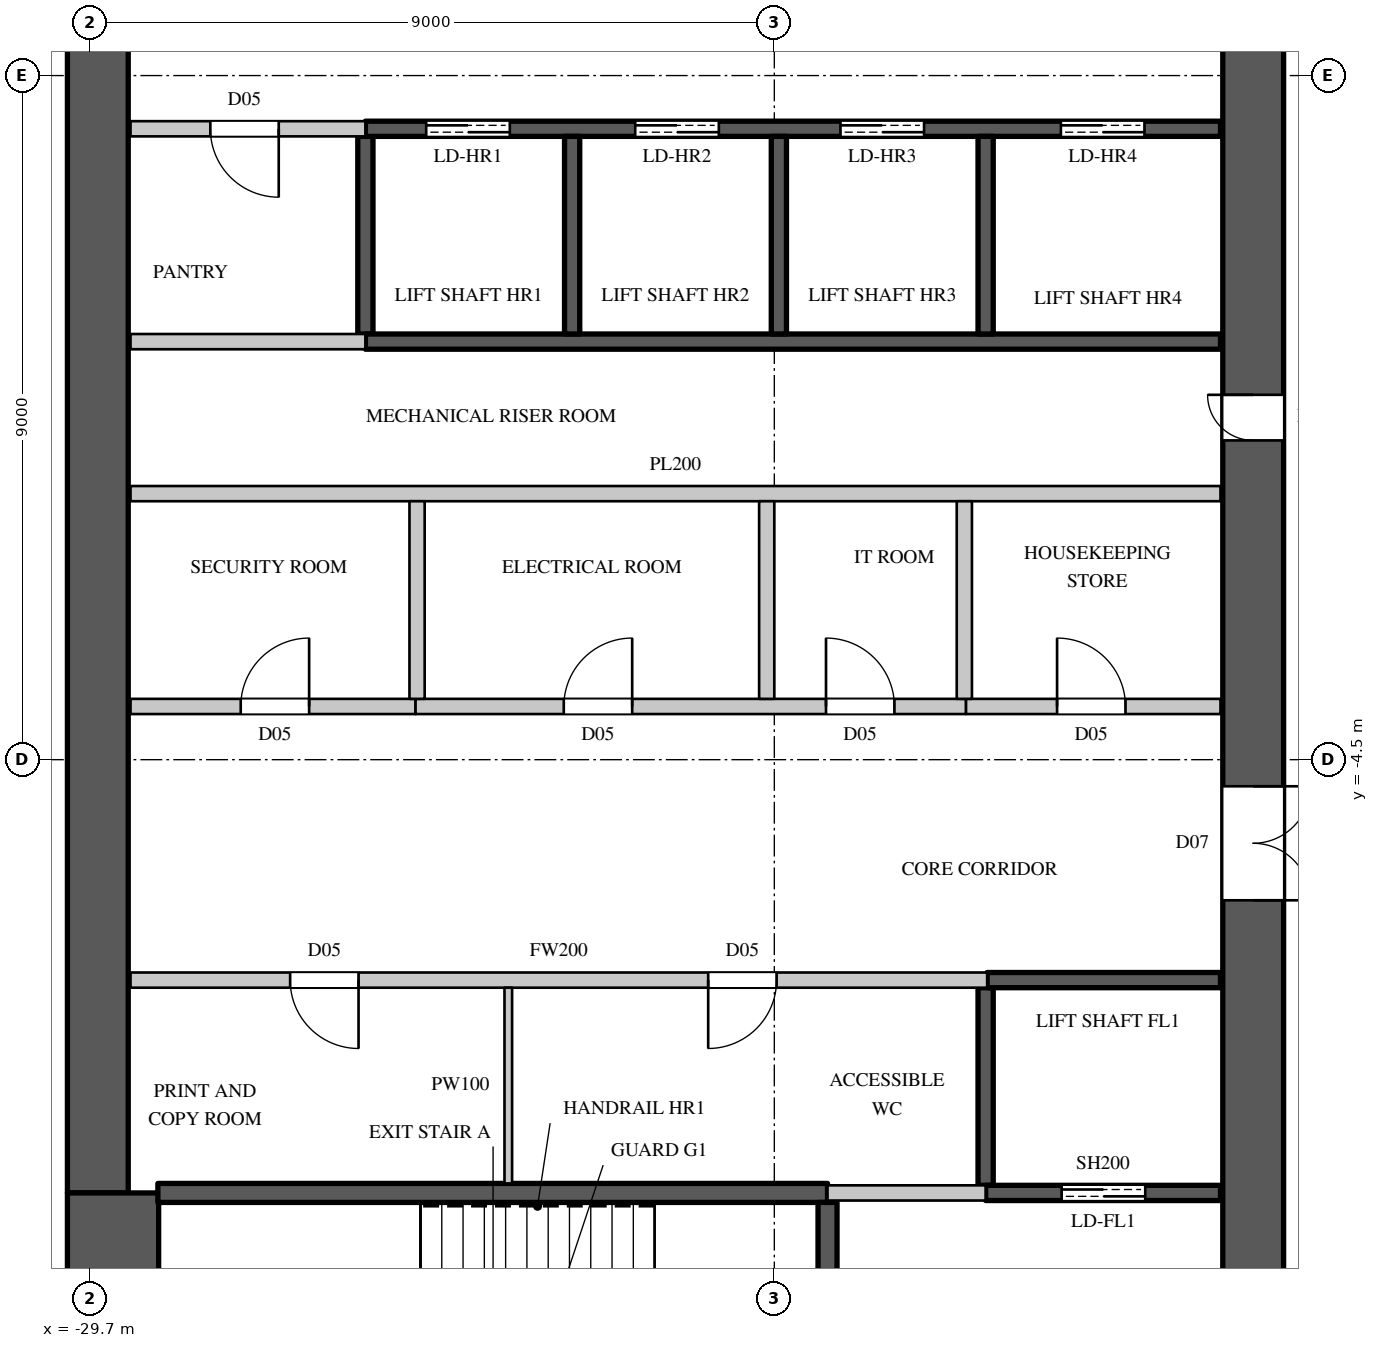
"""IFC4 building model, lengths in metres.
Left out: names, types, materials, properties, quantities, classifications, styles, units other than length and angle.
Written with IfcOpenShell. Run it as: python <this file> out.ifc"""

import sys

from ifc_helpers import new_model, si_unit, direction, frame, frame_2d, origin, place, context, subcontext, project, spatial, rectangle, extrude, element, fill, save


model = new_model("IFC4")
c1 = context("Model", 3, precision=1e-05, world=origin(), true_north=direction((0.0, 1.0)))
c2 = subcontext(c1, "Body", "Model", "MODEL_VIEW")
j1 = project(units=[si_unit("LENGTHUNIT", "METRE"), si_unit("PLANEANGLEUNIT", "RADIAN")], contexts=[c1])
p1 = place(None, origin())
s1 = spatial("IfcSite", under=j1, at=p1, CompositionType="ELEMENT")
p2 = place(p1, origin())
s2 = spatial("IfcBuilding", under=s1, at=p2, CompositionType="ELEMENT")
p3 = place(p2, frame((0.0, 0.0, 234.3)))
s3 = spatial("IfcBuildingStorey", under=s2, at=p3, CompositionType="ELEMENT", Elevation=234.3)
p4 = place(p3, frame((-14.4, -14.8, 0.0), z_axis=(0.0, 0.0, 1.0), x_axis=(0.0, 1.0, 0.0)))
e1 = element("IfcWall", 1, at=p4, inside=s3, PredefinedType="SHEAR", context=c2, shape_type="SweptSolid", body=[
    extrude(rectangle(XDim=29.6, YDim=0.8, at=frame_2d((14.8, 0.0))), origin(), (0.0, 0.0, 1.0), 4.1),
])
p5 = place(p4, frame((1.55, 0.0, 0.0)))
e2 = element("IfcOpeningElement", 2, at=p5, cuts=e1, PredefinedType="OPENING", context=c2, shape_type="SweptSolid", body=[
    extrude(rectangle(XDim=1.5, YDim=2.4, at=frame_2d((0.75, 1.2))), frame((0.0, 0.41, 0.0), z_axis=(0.0, -1.0, 0.0), x_axis=(1.0, 0.0, 0.0)), (0.0, 0.0, 1.0), 0.82),
])
p6 = place(p4, frame((26.55, 0.0, 0.0)))
e3 = element("IfcOpeningElement", 3, at=p6, cuts=e1, PredefinedType="OPENING", context=c2, shape_type="SweptSolid", body=[
    extrude(rectangle(XDim=1.5, YDim=2.4, at=frame_2d((0.75, 1.2))), frame((0.0, 0.41, 0.0), z_axis=(0.0, -1.0, 0.0), x_axis=(1.0, 0.0, 0.0)), (0.0, 0.0, 1.0), 0.82),
])
p7 = place(p4, frame((8.45, 0.0, 0.0)))
e4 = element("IfcOpeningElement", 4, at=p7, cuts=e1, PredefinedType="OPENING", context=c2, shape_type="SweptSolid", body=[
    extrude(rectangle(XDim=1.5, YDim=2.4, at=frame_2d((0.75, 1.2))), frame((0.0, 0.41, 0.0), z_axis=(0.0, -1.0, 0.0), x_axis=(1.0, 0.0, 0.0)), (0.0, 0.0, 1.0), 0.82),
])
p8 = place(p4, frame((19.65, 0.0, 0.0)))
e5 = element("IfcOpeningElement", 5, at=p8, cuts=e1, PredefinedType="OPENING", context=c2, shape_type="SweptSolid", body=[
    extrude(rectangle(XDim=1.5, YDim=2.4, at=frame_2d((0.75, 1.2))), frame((0.0, 0.41, 0.0), z_axis=(0.0, -1.0, 0.0), x_axis=(1.0, 0.0, 0.0)), (0.0, 0.0, 1.0), 0.82),
])
p9 = place(p4, frame((14.5, 0.0, 0.0)))
e6 = element("IfcOpeningElement", 6, at=p9, cuts=e1, PredefinedType="OPENING", context=c2, shape_type="SweptSolid", body=[
    extrude(rectangle(XDim=0.6, YDim=2.0, at=frame_2d((0.3, 1.0))), frame((0.0, 0.41, 0.0), z_axis=(0.0, -1.0, 0.0), x_axis=(1.0, 0.0, 0.0)), (0.0, 0.0, 1.0), 0.82),
])
p10 = place(p3, frame((-29.6, -10.2, 0.0), z_axis=(0.0, 0.0, 1.0), x_axis=(0.0, 1.0, 0.0)))
e7 = element("IfcWall", 7, at=p10, inside=s3, PredefinedType="SHEAR", context=c2, shape_type="SweptSolid", body=[
    extrude(rectangle(XDim=20.4, YDim=0.8, at=frame_2d((10.2, 0.0))), origin(), (0.0, 0.0, 1.0), 4.1),
])
p11 = place(p3, frame((-29.4, -14.8, 0.0), z_axis=(0.0, 0.0, 1.0), x_axis=(0.0, 1.0, 0.0)))
e8 = element("IfcWall", 8, at=p11, inside=s3, PredefinedType="SHEAR", context=c2, shape_type="SweptSolid", body=[
    extrude(rectangle(XDim=4.6, YDim=1.2, at=frame_2d((2.3, 0.0))), origin(), (0.0, 0.0, 1.0), 4.1),
])
p12 = place(p3, frame((-29.17, -7.4, 0.0), z_axis=(0.0, 0.0, 1.0), x_axis=(1.0, 0.0, 0.0)))
e9 = element("IfcWall", 9, at=p12, inside=s3, PredefinedType="PARTITIONING", context=c2, shape_type="SweptSolid", body=[
    extrude(rectangle(XDim=11.27, YDim=0.2, at=frame_2d((5.635, 0.0))), origin(), (0.0, 0.0, 1.0), 3.8),
])
p13 = place(p12, frame((2.1, 0.0, 0.0)))
e10 = element("IfcOpeningElement", 10, at=p13, cuts=e9, PredefinedType="OPENING", context=c2, shape_type="SweptSolid", body=[
    extrude(rectangle(XDim=0.9, YDim=2.2, at=frame_2d((0.45, 1.1))), frame((0.0, 0.11, 0.0), z_axis=(0.0, -1.0, 0.0), x_axis=(1.0, 0.0, 0.0)), (0.0, 0.0, 1.0), 0.22),
])
p14 = place(p12, frame((7.6, 0.0, 0.0)))
e11 = element("IfcOpeningElement", 11, at=p14, cuts=e9, PredefinedType="OPENING", context=c2, shape_type="SweptSolid", body=[
    extrude(rectangle(XDim=0.9, YDim=2.2, at=frame_2d((0.45, 1.1))), frame((0.0, 0.11, 0.0), z_axis=(0.0, -1.0, 0.0), x_axis=(1.0, 0.0, 0.0)), (0.0, 0.0, 1.0), 0.22),
])
p15 = place(p3, frame((-29.17, -3.8, 0.0), z_axis=(0.0, 0.0, 1.0), x_axis=(1.0, 0.0, 0.0)))
e12 = element("IfcWall", 12, at=p15, inside=s3, PredefinedType="PARTITIONING", context=c2, shape_type="SweptSolid", body=[
    extrude(rectangle(XDim=3.75, YDim=0.2, at=frame_2d((1.875, 0.0))), origin(), (0.0, 0.0, 1.0), 3.8),
])
p16 = place(p15, frame((1.45, 0.0, 0.0)))
e13 = element("IfcOpeningElement", 13, at=p16, cuts=e12, PredefinedType="OPENING", context=c2, shape_type="SweptSolid", body=[
    extrude(rectangle(XDim=0.9, YDim=2.2, at=frame_2d((0.45, 1.1))), frame((0.0, 0.11, 0.0), z_axis=(0.0, -1.0, 0.0), x_axis=(1.0, 0.0, 0.0)), (0.0, 0.0, 1.0), 0.22),
])
p17 = place(p3, frame((-29.17, 3.8, 0.0), z_axis=(0.0, 0.0, 1.0), x_axis=(1.0, 0.0, 0.0)))
e14 = element("IfcWall", 14, at=p17, inside=s3, PredefinedType="PARTITIONING", context=c2, shape_type="SweptSolid", body=[
    extrude(rectangle(XDim=3.09, YDim=0.2, at=frame_2d((1.545, 0.0))), origin(), (0.0, 0.0, 1.0), 3.8),
])
p18 = place(p17, frame((1.05, 0.0, 0.0)))
e15 = element("IfcOpeningElement", 15, at=p18, cuts=e14, PredefinedType="OPENING", context=c2, shape_type="SweptSolid", body=[
    extrude(rectangle(XDim=0.9, YDim=2.2, at=frame_2d((0.45, 1.1))), frame((0.0, 0.11, 0.0), z_axis=(0.0, -1.0, 0.0), x_axis=(1.0, 0.0, 0.0)), (0.0, 0.0, 1.0), 0.22),
])
p19 = place(p3, frame((-20.0, -10.2, 0.0), z_axis=(0.0, 0.0, 1.0), x_axis=(1.0, 0.0, 0.0)))
e16 = element("IfcWall", 16, at=p19, inside=s3, PredefinedType="PARTITIONING", context=c2, shape_type="SweptSolid", body=[
    extrude(rectangle(XDim=2.08, YDim=0.2, at=frame_2d((1.04, 0.0))), origin(), (0.0, 0.0, 1.0), 3.8),
])
p20 = place(p3, frame((-18.18, -3.8, 0.0), z_axis=(0.0, 0.0, 1.0), x_axis=(1.0, 0.0, 0.0)))
e17 = element("IfcWall", 17, at=p20, inside=s3, PredefinedType="PARTITIONING", context=c2, shape_type="SweptSolid", body=[
    extrude(rectangle(XDim=3.35, YDim=0.2, at=frame_2d((1.675, 0.0))), origin(), (0.0, 0.0, 1.0), 3.8),
])
p21 = place(p20, frame((1.2, 0.0, 0.0)))
e18 = element("IfcOpeningElement", 18, at=p21, cuts=e17, PredefinedType="OPENING", context=c2, shape_type="SweptSolid", body=[
    extrude(rectangle(XDim=0.9, YDim=2.2, at=frame_2d((0.45, 1.1))), frame((0.0, 0.11, 0.0), z_axis=(0.0, -1.0, 0.0), x_axis=(1.0, 0.0, 0.0)), (0.0, 0.0, 1.0), 0.22),
])
p22 = place(p3, frame((-29.17, -1.0, 0.0), z_axis=(0.0, 0.0, 1.0), x_axis=(1.0, 0.0, 0.0)))
e19 = element("IfcWall", 19, at=p22, inside=s3, PredefinedType="PARTITIONING", context=c2, shape_type="SweptSolid", body=[
    extrude(rectangle(XDim=14.34, YDim=0.2, at=frame_2d((7.17, 0.0))), origin(), (0.0, 0.0, 1.0), 3.8),
])
p23 = place(p3, frame((-29.17, 1.0, 0.0), z_axis=(0.0, 0.0, 1.0), x_axis=(1.0, 0.0, 0.0)))
e20 = element("IfcWall", 20, at=p23, inside=s3, PredefinedType="PARTITIONING", context=c2, shape_type="SweptSolid", body=[
    extrude(rectangle(XDim=3.09, YDim=0.2, at=frame_2d((1.545, 0.0))), origin(), (0.0, 0.0, 1.0), 3.8),
])
p24 = place(p3, frame((-25.42, -3.8, 0.0), z_axis=(0.0, 0.0, 1.0), x_axis=(1.0, 0.0, 0.0)))
e21 = element("IfcWall", 21, at=p24, inside=s3, PredefinedType="PARTITIONING", context=c2, shape_type="SweptSolid", body=[
    extrude(rectangle(XDim=7.24, YDim=0.2, at=frame_2d((3.62, 0.0))), origin(), (0.0, 0.0, 1.0), 3.8),
])
p25 = place(p24, frame((1.95, 0.0, 0.0)))
e22 = element("IfcOpeningElement", 22, at=p25, cuts=e21, PredefinedType="OPENING", context=c2, shape_type="SweptSolid", body=[
    extrude(rectangle(XDim=0.9, YDim=2.2, at=frame_2d((0.45, 1.1))), frame((0.0, 0.11, 0.0), z_axis=(0.0, -1.0, 0.0), x_axis=(1.0, 0.0, 0.0)), (0.0, 0.0, 1.0), 0.22),
])
p26 = place(p24, frame((5.4, 0.0, 0.0)))
e23 = element("IfcOpeningElement", 23, at=p26, cuts=e21, PredefinedType="OPENING", context=c2, shape_type="SweptSolid", body=[
    extrude(rectangle(XDim=0.9, YDim=2.2, at=frame_2d((0.45, 1.1))), frame((0.0, 0.11, 0.0), z_axis=(0.0, -1.0, 0.0), x_axis=(1.0, 0.0, 0.0)), (0.0, 0.0, 1.0), 0.22),
])
for number, where, z_axis, x_axis in (
    (24, (-25.4, -3.7, 0.0), (0.0, 0.0, 1.0), (0.0, 1.0, 0.0)),
    (25, (-20.8, -3.7, 0.0), (0.0, 0.0, 1.0), (0.0, 1.0, 0.0)),
    (26, (-18.2, -3.7, 0.0), (0.0, 0.0, 1.0), (0.0, 1.0, 0.0)),
):
    element("IfcWall", number, at=place(p3, frame(where, z_axis=z_axis, x_axis=x_axis)), inside=s3, PredefinedType="PARTITIONING", context=c2, shape_type="SweptSolid", body=[
        extrude(rectangle(XDim=2.6, YDim=0.2, at=frame_2d((1.3, 0.0))), origin(), (0.0, 0.0, 1.0), 3.8),
    ])
p27 = place(p3, frame((-26.08, 1.1, 0.0), z_axis=(0.0, 0.0, 1.0), x_axis=(0.0, 1.0, 0.0)))
e27 = element("IfcWall", 27, at=p27, inside=s3, PredefinedType="SHEAR", context=c2, shape_type="SweptSolid", body=[
    extrude(rectangle(XDim=2.6, YDim=0.2, at=frame_2d((1.3, 0.0))), origin(), (0.0, 0.0, 1.0), 3.8),
])
p28 = place(p3, frame((-26.08, 1.0, 0.0), z_axis=(0.0, 0.0, 1.0), x_axis=(1.0, 0.0, 0.0)))
e28 = element("IfcWall", 28, at=p28, inside=s3, PredefinedType="SHEAR", context=c2, shape_type="SweptSolid", body=[
    extrude(rectangle(XDim=11.25, YDim=0.2, at=frame_2d((5.625, 0.0))), origin(), (0.0, 0.0, 1.0), 3.8),
])
p29 = place(p3, frame((-26.08, 3.8, 0.0), z_axis=(0.0, 0.0, 1.0), x_axis=(1.0, 0.0, 0.0)))
e29 = element("IfcWall", 29, at=p29, inside=s3, PredefinedType="SHEAR", context=c2, shape_type="SweptSolid", body=[
    extrude(rectangle(XDim=11.25, YDim=0.2, at=frame_2d((5.625, 0.0))), origin(), (0.0, 0.0, 1.0), 3.8),
])
p30 = place(p29, frame((0.8, 0.0, 0.0)))
e30 = element("IfcOpeningElement", 30, at=p30, cuts=e29, PredefinedType="OPENING", context=c2, shape_type="SweptSolid", body=[
    extrude(rectangle(XDim=1.1, YDim=2.2, at=frame_2d((0.55, 1.1))), frame((0.0, 0.11, 0.0), z_axis=(0.0, -1.0, 0.0), x_axis=(1.0, 0.0, 0.0)), (0.0, 0.0, 1.0), 0.22),
])
p31 = place(p29, frame((3.55, 0.0, 0.0)))
e31 = element("IfcOpeningElement", 31, at=p31, cuts=e29, PredefinedType="OPENING", context=c2, shape_type="SweptSolid", body=[
    extrude(rectangle(XDim=1.1, YDim=2.2, at=frame_2d((0.55, 1.1))), frame((0.0, 0.11, 0.0), z_axis=(0.0, -1.0, 0.0), x_axis=(1.0, 0.0, 0.0)), (0.0, 0.0, 1.0), 0.22),
])
p32 = place(p29, frame((6.25, 0.0, 0.0)))
e32 = element("IfcOpeningElement", 32, at=p32, cuts=e29, PredefinedType="OPENING", context=c2, shape_type="SweptSolid", body=[
    extrude(rectangle(XDim=1.1, YDim=2.2, at=frame_2d((0.55, 1.1))), frame((0.0, 0.11, 0.0), z_axis=(0.0, -1.0, 0.0), x_axis=(1.0, 0.0, 0.0)), (0.0, 0.0, 1.0), 0.22),
])
p33 = place(p29, frame((9.15, 0.0, 0.0)))
e33 = element("IfcOpeningElement", 33, at=p33, cuts=e29, PredefinedType="OPENING", context=c2, shape_type="SweptSolid", body=[
    extrude(rectangle(XDim=1.1, YDim=2.2, at=frame_2d((0.55, 1.1))), frame((0.0, 0.11, 0.0), z_axis=(0.0, -1.0, 0.0), x_axis=(1.0, 0.0, 0.0)), (0.0, 0.0, 1.0), 0.22),
])
for number, where, z_axis, x_axis in (
    (34, (-23.36, 1.1, 0.0), (0.0, 0.0, 1.0), (0.0, 1.0, 0.0)),
    (35, (-20.64, 1.1, 0.0), (0.0, 0.0, 1.0), (0.0, 1.0, 0.0)),
):
    element("IfcWall", number, at=place(p3, frame(where, z_axis=z_axis, x_axis=x_axis)), inside=s3, PredefinedType="SHEAR", context=c2, shape_type="SweptSolid", body=[
        extrude(rectangle(XDim=2.6, YDim=0.2, at=frame_2d((1.3, 0.0))), origin(), (0.0, 0.0, 1.0), 3.8),
    ])
p34 = place(p3, frame((-17.92, -10.1, 0.0), z_axis=(0.0, 0.0, 1.0), x_axis=(0.0, 1.0, 0.0)))
e36 = element("IfcWall", 36, at=p34, inside=s3, PredefinedType="SHEAR", context=c2, shape_type="SweptSolid", body=[
    extrude(rectangle(XDim=2.6, YDim=0.2, at=frame_2d((1.3, 0.0))), origin(), (0.0, 0.0, 1.0), 3.8),
])
p35 = place(p3, frame((-17.92, -10.2, 0.0), z_axis=(0.0, 0.0, 1.0), x_axis=(1.0, 0.0, 0.0)))
e37 = element("IfcWall", 37, at=p35, inside=s3, PredefinedType="SHEAR", context=c2, shape_type="SweptSolid", body=[
    extrude(rectangle(XDim=3.09, YDim=0.2, at=frame_2d((1.545, 0.0))), origin(), (0.0, 0.0, 1.0), 3.8),
])
p36 = place(p35, frame((1.0, 0.0, 0.0)))
e38 = element("IfcOpeningElement", 38, at=p36, cuts=e37, PredefinedType="OPENING", context=c2, shape_type="SweptSolid", body=[
    extrude(rectangle(XDim=1.1, YDim=2.2, at=frame_2d((0.55, 1.1))), frame((0.0, 0.11, 0.0), z_axis=(0.0, -1.0, 0.0), x_axis=(1.0, 0.0, 0.0)), (0.0, 0.0, 1.0), 0.22),
])
p37 = place(p3, frame((-17.9, -7.4, 0.0), z_axis=(0.0, 0.0, 1.0), x_axis=(1.0, 0.0, 0.0)))
e39 = element("IfcWall", 39, at=p37, inside=s3, PredefinedType="SHEAR", context=c2, shape_type="SweptSolid", body=[
    extrude(rectangle(XDim=3.07, YDim=0.2, at=frame_2d((1.535, 0.0))), origin(), (0.0, 0.0, 1.0), 3.8),
])
p38 = place(p3, frame((-17.92, 1.1, 0.0), z_axis=(0.0, 0.0, 1.0), x_axis=(0.0, 1.0, 0.0)))
e40 = element("IfcWall", 40, at=p38, inside=s3, PredefinedType="SHEAR", context=c2, shape_type="SweptSolid", body=[
    extrude(rectangle(XDim=2.6, YDim=0.2, at=frame_2d((1.3, 0.0))), origin(), (0.0, 0.0, 1.0), 3.8),
])
p39 = place(p3, frame((-28.81, -10.2, 0.0), z_axis=(0.0, 0.0, 1.0), x_axis=(1.0, 0.0, 0.0)))
e41 = element("IfcWall", 41, at=p39, inside=s3, PredefinedType="SHEAR", context=c2, shape_type="SweptSolid", body=[
    extrude(rectangle(XDim=8.81, YDim=0.25, at=frame_2d((4.405, 0.0))), origin(), (0.0, 0.0, 1.0), 3.8),
])
p40 = place(p3, frame((-20.0, -14.77, 0.0), z_axis=(0.0, 0.0, 1.0), x_axis=(0.0, 1.0, 0.0)))
e42 = element("IfcWall", 42, at=p40, inside=s3, PredefinedType="SHEAR", context=c2, shape_type="SweptSolid", body=[
    extrude(rectangle(XDim=4.445, YDim=0.25, at=frame_2d((2.223, 0.0))), origin(), (0.0, 0.0, 1.0), 3.8),
])
p41 = place(p40, frame((1.7, 0.0, 0.0)))
e43 = element("IfcOpeningElement", 43, at=p41, cuts=e42, PredefinedType="OPENING", context=c2, shape_type="SweptSolid", body=[
    extrude(rectangle(XDim=1.1, YDim=2.2, at=frame_2d((0.55, 1.1))), frame((0.0, 0.135, 0.0), z_axis=(0.0, -1.0, 0.0), x_axis=(1.0, 0.0, 0.0)), (0.0, 0.0, 1.0), 0.27),
])
p42 = place(p3, frame((-24.2, -10.075, 0.0), z_axis=(0.0, 0.0, 1.0), x_axis=(0.0, 1.0, 0.0)))
e44 = element("IfcWall", 44, at=p42, inside=s3, PredefinedType="PARTITIONING", context=c2, shape_type="SweptSolid", body=[
    extrude(rectangle(XDim=2.575, YDim=0.1, at=frame_2d((1.288, 0.0))), origin(), (0.0, 0.0, 1.0), 3.8),
])
p43 = place(p13, origin())
e45 = element("IfcDoor", 45, at=p43, inside=s3, OperationType="SINGLE_SWING_LEFT", PredefinedType="DOOR", context=c2, shape_type="SweptSolid", body=[
    extrude(rectangle(XDim=0.9, YDim=2.2, at=frame_2d((0.45, 1.1))), frame((0.0, 0.025, 0.0), z_axis=(0.0, -1.0, 0.0), x_axis=(1.0, 0.0, 0.0)), (0.0, 0.0, 1.0), 0.05),
])
fill(e10, e45)
p44 = place(p14, origin())
e46 = element("IfcDoor", 46, at=p44, inside=s3, OperationType="SINGLE_SWING_RIGHT", PredefinedType="DOOR", context=c2, shape_type="SweptSolid", body=[
    extrude(rectangle(XDim=0.9, YDim=2.2, at=frame_2d((0.45, 1.1))), frame((0.0, 0.025, 0.0), z_axis=(0.0, -1.0, 0.0), x_axis=(1.0, 0.0, 0.0)), (0.0, 0.0, 1.0), 0.05),
])
fill(e11, e46)
p45 = place(p16, origin())
e47 = element("IfcDoor", 47, at=p45, inside=s3, OperationType="SINGLE_SWING_RIGHT", PredefinedType="DOOR", context=c2, shape_type="SweptSolid", body=[
    extrude(rectangle(XDim=0.9, YDim=2.2, at=frame_2d((0.45, 1.1))), frame((0.0, 0.025, 0.0), z_axis=(0.0, -1.0, 0.0), x_axis=(1.0, 0.0, 0.0)), (0.0, 0.0, 1.0), 0.05),
])
fill(e13, e47)
p46 = place(p25, origin())
e48 = element("IfcDoor", 48, at=p46, inside=s3, OperationType="SINGLE_SWING_RIGHT", PredefinedType="DOOR", context=c2, shape_type="SweptSolid", body=[
    extrude(rectangle(XDim=0.9, YDim=2.2, at=frame_2d((0.45, 1.1))), frame((0.0, 0.025, 0.0), z_axis=(0.0, -1.0, 0.0), x_axis=(1.0, 0.0, 0.0)), (0.0, 0.0, 1.0), 0.05),
])
fill(e22, e48)
p47 = place(p26, origin())
e49 = element("IfcDoor", 49, at=p47, inside=s3, OperationType="SINGLE_SWING_LEFT", PredefinedType="DOOR", context=c2, shape_type="SweptSolid", body=[
    extrude(rectangle(XDim=0.9, YDim=2.2, at=frame_2d((0.45, 1.1))), frame((0.0, 0.025, 0.0), z_axis=(0.0, -1.0, 0.0), x_axis=(1.0, 0.0, 0.0)), (0.0, 0.0, 1.0), 0.05),
])
fill(e23, e49)
p48 = place(p21, origin())
e50 = element("IfcDoor", 50, at=p48, inside=s3, OperationType="SINGLE_SWING_LEFT", PredefinedType="DOOR", context=c2, shape_type="SweptSolid", body=[
    extrude(rectangle(XDim=0.9, YDim=2.2, at=frame_2d((0.45, 1.1))), frame((0.0, 0.025, 0.0), z_axis=(0.0, -1.0, 0.0), x_axis=(1.0, 0.0, 0.0)), (0.0, 0.0, 1.0), 0.05),
])
fill(e18, e50)
p49 = place(p18, origin())
e51 = element("IfcDoor", 51, at=p49, inside=s3, OperationType="SINGLE_SWING_LEFT", PredefinedType="DOOR", context=c2, shape_type="SweptSolid", body=[
    extrude(rectangle(XDim=0.9, YDim=2.2, at=frame_2d((0.45, 1.1))), frame((0.0, 0.025, 0.0), z_axis=(0.0, -1.0, 0.0), x_axis=(1.0, 0.0, 0.0)), (0.0, 0.0, 1.0), 0.05),
])
fill(e15, e51)
p50 = place(p36, origin())
e52 = element("IfcDoor", 52, at=p50, inside=s3, OperationType="DOUBLE_DOOR_SLIDING", PredefinedType="DOOR", context=c2, shape_type="SweptSolid", body=[
    extrude(rectangle(XDim=1.1, YDim=2.2, at=frame_2d((0.55, 1.1))), frame((0.0, 0.025, 0.0), z_axis=(0.0, -1.0, 0.0), x_axis=(1.0, 0.0, 0.0)), (0.0, 0.0, 1.0), 0.05),
])
fill(e38, e52)
p51 = place(p30, origin())
e53 = element("IfcDoor", 53, at=p51, inside=s3, OperationType="DOUBLE_DOOR_SLIDING", PredefinedType="DOOR", context=c2, shape_type="SweptSolid", body=[
    extrude(rectangle(XDim=1.1, YDim=2.2, at=frame_2d((0.55, 1.1))), frame((0.0, 0.025, 0.0), z_axis=(0.0, -1.0, 0.0), x_axis=(1.0, 0.0, 0.0)), (0.0, 0.0, 1.0), 0.05),
])
fill(e30, e53)
p52 = place(p31, origin())
e54 = element("IfcDoor", 54, at=p52, inside=s3, OperationType="DOUBLE_DOOR_SLIDING", PredefinedType="DOOR", context=c2, shape_type="SweptSolid", body=[
    extrude(rectangle(XDim=1.1, YDim=2.2, at=frame_2d((0.55, 1.1))), frame((0.0, 0.025, 0.0), z_axis=(0.0, -1.0, 0.0), x_axis=(1.0, 0.0, 0.0)), (0.0, 0.0, 1.0), 0.05),
])
fill(e31, e54)
p53 = place(p32, origin())
e55 = element("IfcDoor", 55, at=p53, inside=s3, OperationType="DOUBLE_DOOR_SLIDING", PredefinedType="DOOR", context=c2, shape_type="SweptSolid", body=[
    extrude(rectangle(XDim=1.1, YDim=2.2, at=frame_2d((0.55, 1.1))), frame((0.0, 0.025, 0.0), z_axis=(0.0, -1.0, 0.0), x_axis=(1.0, 0.0, 0.0)), (0.0, 0.0, 1.0), 0.05),
])
fill(e32, e55)
p54 = place(p33, origin())
e56 = element("IfcDoor", 56, at=p54, inside=s3, OperationType="DOUBLE_DOOR_SLIDING", PredefinedType="DOOR", context=c2, shape_type="SweptSolid", body=[
    extrude(rectangle(XDim=1.1, YDim=2.2, at=frame_2d((0.55, 1.1))), frame((0.0, 0.025, 0.0), z_axis=(0.0, -1.0, 0.0), x_axis=(1.0, 0.0, 0.0)), (0.0, 0.0, 1.0), 0.05),
])
fill(e33, e56)
p55 = place(p7, origin())
e57 = element("IfcDoor", 57, at=p55, inside=s3, OperationType="DOUBLE_DOOR_SINGLE_SWING", PredefinedType="DOOR", context=c2, shape_type="SweptSolid", body=[
    extrude(rectangle(XDim=1.5, YDim=2.4, at=frame_2d((0.75, 1.2))), frame((0.0, -0.345, 0.0), z_axis=(0.0, -1.0, 0.0), x_axis=(1.0, 0.0, 0.0)), (0.0, 0.0, 1.0), 0.05),
])
fill(e4, e57)
p56 = place(p9, origin())
e58 = element("IfcDoor", 58, at=p56, inside=s3, OperationType="SINGLE_SWING_RIGHT", PredefinedType="DOOR", context=c2, shape_type="SweptSolid", body=[
    extrude(rectangle(XDim=0.6, YDim=2.0, at=frame_2d((0.3, 1.0))), frame((0.0, 0.395, 0.0), z_axis=(0.0, -1.0, 0.0), x_axis=(1.0, 0.0, 0.0)), (0.0, 0.0, 1.0), 0.05),
])
fill(e6, e58)
save(model, sys.argv[1])
